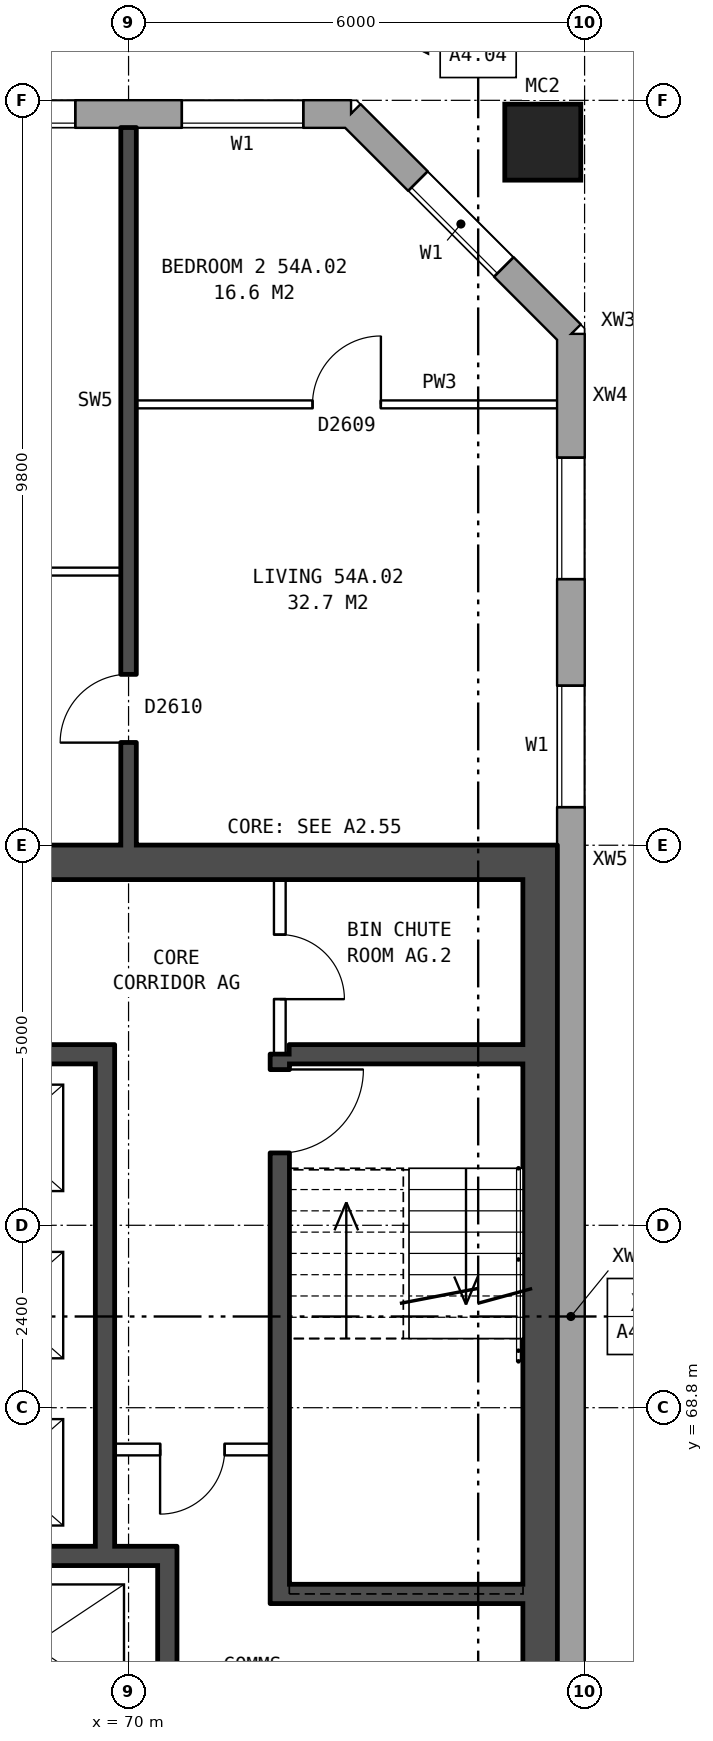
"""IFC4 building model, lengths in metres.
Left out: names, types, materials, properties, quantities, classifications, styles, units other than length and angle.
Written with IfcOpenShell. Run it as: python <this file> out.ifc"""

import sys

from ifc_helpers import new_model, si_unit, direction, frame, frame_2d, origin, origin_2d, place, context, subcontext, project, spatial, rectangle, hollow_rectangle, extrude, element, fill, save


model = new_model("IFC4")
c1 = context("Model", 3, precision=1e-05, world=origin(), true_north=direction((0.0, 1.0)))
c2 = subcontext(c1, "Body", "Model", "MODEL_VIEW")
j1 = project(units=[si_unit("LENGTHUNIT", "METRE"), si_unit("PLANEANGLEUNIT", "RADIAN")], contexts=[c1])
p1 = place(None, origin())
s1 = spatial("IfcSite", under=j1, at=p1, CompositionType="ELEMENT")
p2 = place(p1, origin())
s2 = spatial("IfcBuilding", under=s1, at=p2, CompositionType="ELEMENT")
p3 = place(p2, frame((0.0, 0.0, 191.3)))
s3 = spatial("IfcBuildingStorey", under=s2, at=p3, CompositionType="ELEMENT", Elevation=191.3)
p4 = place(p3, frame((75.45, 85.45, 0.0), z_axis=(0.0, 0.0, 1.0), x_axis=(1.0, 0.0, 0.0)))
e1 = element("IfcColumn", 1, at=p4, inside=s3, PredefinedType="COLUMN", context=c2, shape_type="SweptSolid", body=[
    extrude(hollow_rectangle(XDim=1.0, YDim=1.0, WallThickness=0.055, at=origin_2d()), origin(), (0.0, 0.0, 1.0), 3.1),
])
p5 = place(p3, frame((75.82, 64.403, 0.0), z_axis=(0.0, 0.0, 1.0), x_axis=(0.0, 1.0, 0.0)))
e2 = element("IfcWall", 2, at=p5, inside=s3, PredefinedType="STANDARD", context=c2, shape_type="SweptSolid", body=[
    extrude(rectangle(XDim=11.194, YDim=0.36, at=frame_2d((5.597, 0.0))), origin(), (0.0, 0.0, 1.0), 2.85),
])
p6 = place(p3, frame((75.82, 75.597, 0.0), z_axis=(0.0, 0.0, 1.0), x_axis=(0.0, 1.0, 0.0)))
e3 = element("IfcWall", 3, at=p6, inside=s3, PredefinedType="STANDARD", context=c2, shape_type="SweptSolid", body=[
    extrude(rectangle(XDim=0.806, YDim=0.36, at=frame_2d((0.403, 0.0))), origin(), (0.0, 0.0, 1.0), 1.947),
])
p7 = place(p3, frame((75.82, 76.403, 0.0), z_axis=(0.0, 0.0, 1.0), x_axis=(0.0, 1.0, 0.0)))
e4 = element("IfcWall", 4, at=p7, inside=s3, PredefinedType="STANDARD", context=c2, shape_type="SweptSolid", body=[
    extrude(rectangle(XDim=6.522, YDim=0.36, at=frame_2d((3.261, 0.0))), origin(), (0.0, 0.0, 1.0), 2.85),
])
p8 = place(p7, frame((0.297, 0.0, 0.8)))
e5 = element("IfcOpeningElement", 5, at=p8, cuts=e4, PredefinedType="OPENING", context=c2, shape_type="SweptSolid", body=[
    extrude(rectangle(XDim=1.6, YDim=1.8, at=frame_2d((0.8, 0.9))), frame((0.0, 0.19, 0.0), z_axis=(0.0, -1.0, 0.0), x_axis=(1.0, 0.0, 0.0)), (0.0, 0.0, 1.0), 0.38),
])
p9 = place(p7, frame((3.297, 0.0, 0.8)))
e6 = element("IfcOpeningElement", 6, at=p9, cuts=e4, PredefinedType="OPENING", context=c2, shape_type="SweptSolid", body=[
    extrude(rectangle(XDim=1.6, YDim=1.8, at=frame_2d((0.8, 0.9))), frame((0.0, 0.19, 0.0), z_axis=(0.0, -1.0, 0.0), x_axis=(1.0, 0.0, 0.0)), (0.0, 0.0, 1.0), 0.38),
])
p10 = place(p3, frame((75.82, 82.925, 0.0), z_axis=(0.0, 0.0, 1.0), x_axis=(-0.707106781187, 0.707106781187, 0.0)))
e7 = element("IfcWall", 7, at=p10, inside=s3, PredefinedType="STANDARD", context=c2, shape_type="SweptSolid", body=[
    extrude(rectangle(XDim=4.094, YDim=0.36, at=frame_2d((2.047, 0.0))), origin(), (0.0, 0.0, 1.0), 2.85),
])
p11 = place(p10, frame((1.247, 0.0, 0.8)))
e8 = element("IfcOpeningElement", 8, at=p11, cuts=e7, PredefinedType="OPENING", context=c2, shape_type="SweptSolid", body=[
    extrude(rectangle(XDim=1.6, YDim=1.8, at=frame_2d((0.8, 0.9))), frame((0.0, 0.19, 0.0), z_axis=(0.0, -1.0, 0.0), x_axis=(1.0, 0.0, 0.0)), (0.0, 0.0, 1.0), 0.38),
])
p12 = place(p3, frame((72.925, 85.82, 0.0), z_axis=(0.0, 0.0, 1.0), x_axis=(-1.0, 0.0, 0.0)))
e9 = element("IfcWall", 9, at=p12, inside=s3, PredefinedType="STANDARD", context=c2, shape_type="SweptSolid", body=[
    extrude(rectangle(XDim=39.601, YDim=0.36, at=frame_2d((19.8, 0.0))), origin(), (0.0, 0.0, 1.0), 2.85),
])
p13 = place(p12, frame((0.625, 0.0, 0.8)))
e10 = element("IfcOpeningElement", 10, at=p13, cuts=e9, PredefinedType="OPENING", context=c2, shape_type="SweptSolid", body=[
    extrude(rectangle(XDim=1.6, YDim=1.8, at=frame_2d((0.8, 0.9))), frame((0.0, 0.19, 0.0), z_axis=(0.0, -1.0, 0.0), x_axis=(1.0, 0.0, 0.0)), (0.0, 0.0, 1.0), 0.38),
])
p14 = place(p12, frame((3.625, 0.0, 0.8)))
e11 = element("IfcOpeningElement", 11, at=p14, cuts=e9, PredefinedType="OPENING", context=c2, shape_type="SweptSolid", body=[
    extrude(rectangle(XDim=1.6, YDim=1.8, at=frame_2d((0.8, 0.9))), frame((0.0, 0.19, 0.0), z_axis=(0.0, -1.0, 0.0), x_axis=(1.0, 0.0, 0.0)), (0.0, 0.0, 1.0), 0.38),
])
p15 = place(p12, frame((6.625, 0.0, 0.8)))
e12 = element("IfcOpeningElement", 12, at=p15, cuts=e9, PredefinedType="OPENING", context=c2, shape_type="SweptSolid", body=[
    extrude(rectangle(XDim=1.6, YDim=1.8, at=frame_2d((0.8, 0.9))), frame((0.0, 0.19, 0.0), z_axis=(0.0, -1.0, 0.0), x_axis=(1.0, 0.0, 0.0)), (0.0, 0.0, 1.0), 0.38),
])
p16 = place(p12, frame((9.625, 0.0, 0.8)))
e13 = element("IfcOpeningElement", 13, at=p16, cuts=e9, PredefinedType="OPENING", context=c2, shape_type="SweptSolid", body=[
    extrude(rectangle(XDim=1.6, YDim=1.8, at=frame_2d((0.8, 0.9))), frame((0.0, 0.19, 0.0), z_axis=(0.0, -1.0, 0.0), x_axis=(1.0, 0.0, 0.0)), (0.0, 0.0, 1.0), 0.38),
])
p17 = place(p12, frame((12.625, 0.0, 0.8)))
e14 = element("IfcOpeningElement", 14, at=p17, cuts=e9, PredefinedType="OPENING", context=c2, shape_type="SweptSolid", body=[
    extrude(rectangle(XDim=1.6, YDim=1.8, at=frame_2d((0.8, 0.9))), frame((0.0, 0.19, 0.0), z_axis=(0.0, -1.0, 0.0), x_axis=(1.0, 0.0, 0.0)), (0.0, 0.0, 1.0), 0.38),
])
p18 = place(p12, frame((15.625, 0.0, 0.8)))
e15 = element("IfcOpeningElement", 15, at=p18, cuts=e9, PredefinedType="OPENING", context=c2, shape_type="SweptSolid", body=[
    extrude(rectangle(XDim=1.6, YDim=1.8, at=frame_2d((0.8, 0.9))), frame((0.0, 0.19, 0.0), z_axis=(0.0, -1.0, 0.0), x_axis=(1.0, 0.0, 0.0)), (0.0, 0.0, 1.0), 0.38),
])
p19 = place(p12, frame((18.975, 0.0, 0.15)))
e16 = element("IfcOpeningElement", 16, at=p19, cuts=e9, PredefinedType="OPENING", context=c2, shape_type="SweptSolid", body=[
    extrude(rectangle(XDim=1.6, YDim=1.2, at=frame_2d((0.8, 0.6))), frame((0.0, 0.19, 0.0), z_axis=(0.0, -1.0, 0.0), x_axis=(1.0, 0.0, 0.0)), (0.0, 0.0, 1.0), 0.38),
])
p20 = place(p12, frame((21.375, 0.0, 1.7)))
e17 = element("IfcOpeningElement", 17, at=p20, cuts=e9, PredefinedType="OPENING", context=c2, shape_type="SweptSolid", body=[
    extrude(rectangle(XDim=0.6, YDim=0.9, at=frame_2d((0.3, 0.45))), frame((0.0, 0.19, 0.0), z_axis=(0.0, -1.0, 0.0), x_axis=(1.0, 0.0, 0.0)), (0.0, 0.0, 1.0), 0.38),
])
p21 = place(p12, frame((24.625, 0.0, 0.8)))
e18 = element("IfcOpeningElement", 18, at=p21, cuts=e9, PredefinedType="OPENING", context=c2, shape_type="SweptSolid", body=[
    extrude(rectangle(XDim=1.6, YDim=1.8, at=frame_2d((0.8, 0.9))), frame((0.0, 0.19, 0.0), z_axis=(0.0, -1.0, 0.0), x_axis=(1.0, 0.0, 0.0)), (0.0, 0.0, 1.0), 0.38),
])
p22 = place(p12, frame((27.625, 0.0, 0.8)))
e19 = element("IfcOpeningElement", 19, at=p22, cuts=e9, PredefinedType="OPENING", context=c2, shape_type="SweptSolid", body=[
    extrude(rectangle(XDim=1.6, YDim=1.8, at=frame_2d((0.8, 0.9))), frame((0.0, 0.19, 0.0), z_axis=(0.0, -1.0, 0.0), x_axis=(1.0, 0.0, 0.0)), (0.0, 0.0, 1.0), 0.38),
])
p23 = place(p12, frame((30.625, 0.0, 0.8)))
e20 = element("IfcOpeningElement", 20, at=p23, cuts=e9, PredefinedType="OPENING", context=c2, shape_type="SweptSolid", body=[
    extrude(rectangle(XDim=1.6, YDim=1.8, at=frame_2d((0.8, 0.9))), frame((0.0, 0.19, 0.0), z_axis=(0.0, -1.0, 0.0), x_axis=(1.0, 0.0, 0.0)), (0.0, 0.0, 1.0), 0.38),
])
p24 = place(p12, frame((33.625, 0.0, 0.8)))
e21 = element("IfcOpeningElement", 21, at=p24, cuts=e9, PredefinedType="OPENING", context=c2, shape_type="SweptSolid", body=[
    extrude(rectangle(XDim=1.6, YDim=1.8, at=frame_2d((0.8, 0.9))), frame((0.0, 0.19, 0.0), z_axis=(0.0, -1.0, 0.0), x_axis=(1.0, 0.0, 0.0)), (0.0, 0.0, 1.0), 0.38),
])
p25 = place(p12, frame((36.625, 0.0, 0.8)))
e22 = element("IfcOpeningElement", 22, at=p25, cuts=e9, PredefinedType="OPENING", context=c2, shape_type="SweptSolid", body=[
    extrude(rectangle(XDim=1.6, YDim=1.8, at=frame_2d((0.8, 0.9))), frame((0.0, 0.19, 0.0), z_axis=(0.0, -1.0, 0.0), x_axis=(1.0, 0.0, 0.0)), (0.0, 0.0, 1.0), 0.38),
])
p26 = place(p12, frame((22.275, 0.0, 0.8)))
e23 = element("IfcOpeningElement", 23, at=p26, cuts=e9, PredefinedType="OPENING", context=c2, shape_type="SweptSolid", body=[
    extrude(rectangle(XDim=1.4, YDim=1.8, at=frame_2d((0.7, 0.9))), frame((0.0, 0.19, 0.0), z_axis=(0.0, -1.0, 0.0), x_axis=(1.0, 0.0, 0.0)), (0.0, 0.0, 1.0), 0.38),
])
p27 = place(p3, frame((75.415, 63.8, 0.0), z_axis=(0.0, 0.0, 1.0), x_axis=(0.0, 1.0, 0.0)))
e24 = element("IfcWall", 24, at=p27, inside=s3, PredefinedType="SHEAR", context=c2, shape_type="SweptSolid", body=[
    extrude(rectangle(XDim=12.4, YDim=0.45, at=frame_2d((6.2, 0.0))), origin(), (0.0, 0.0, 1.0), 2.85),
])
p28 = place(p3, frame((67.09, 75.975, 0.0), z_axis=(0.0, 0.0, 1.0), x_axis=(1.0, 0.0, 0.0)))
e25 = element("IfcWall", 25, at=p28, inside=s3, PredefinedType="SHEAR", context=c2, shape_type="SweptSolid", body=[
    extrude(rectangle(XDim=8.1, YDim=0.45, at=frame_2d((4.05, 0.0))), origin(), (0.0, 0.0, 1.0), 2.85),
])
p29 = place(p3, frame((72.115, 66.35, 0.0), z_axis=(0.0, 0.0, 1.0), x_axis=(1.0, 0.0, 0.0)))
e26 = element("IfcWall", 26, at=p29, inside=s3, PredefinedType="SHEAR", context=c2, shape_type="SweptSolid", body=[
    extrude(rectangle(XDim=3.075, YDim=0.25, at=frame_2d((1.538, 0.0))), origin(), (0.0, 0.0, 1.0), 2.85),
])
p30 = place(p3, frame((67.09, 66.85, 0.0), z_axis=(0.0, 0.0, 1.0), x_axis=(1.0, 0.0, 0.0)))
e27 = element("IfcWall", 27, at=p30, inside=s3, PredefinedType="SHEAR", context=c2, shape_type="SweptSolid", body=[
    extrude(rectangle(XDim=3.545, YDim=0.25, at=frame_2d((1.772, 0.0))), origin(), (0.0, 0.0, 1.0), 2.85),
])
p31 = place(p3, frame((69.815, 68.25, 0.0), z_axis=(0.0, 0.0, 1.0), x_axis=(1.0, 0.0, 0.0)))
e28 = element("IfcWall", 28, at=p31, inside=s3, PredefinedType="PARTITIONING", context=c2, shape_type="SweptSolid", body=[
    extrude(rectangle(XDim=2.05, YDim=0.15, at=frame_2d((1.025, 0.0))), origin(), (0.0, 0.0, 1.0), 2.85),
])
p32 = place(p31, frame((0.6, 0.0, 0.0)))
e29 = element("IfcOpeningElement", 29, at=p32, cuts=e28, PredefinedType="OPENING", context=c2, shape_type="SweptSolid", body=[
    extrude(rectangle(XDim=0.85, YDim=2.1, at=frame_2d((0.425, 1.05))), frame((0.0, 0.085, 0.0), z_axis=(0.0, -1.0, 0.0), x_axis=(1.0, 0.0, 0.0)), (0.0, 0.0, 1.0), 0.17),
])
p33 = place(p3, frame((67.09, 73.45, 0.0), z_axis=(0.0, 0.0, 1.0), x_axis=(1.0, 0.0, 0.0)))
e30 = element("IfcWall", 30, at=p33, inside=s3, PredefinedType="SHEAR", context=c2, shape_type="SweptSolid", body=[
    extrude(rectangle(XDim=2.475, YDim=0.25, at=frame_2d((1.237, 0.0))), origin(), (0.0, 0.0, 1.0), 2.85),
])
p34 = place(p3, frame((72.115, 73.45, 0.0), z_axis=(0.0, 0.0, 1.0), x_axis=(1.0, 0.0, 0.0)))
e31 = element("IfcWall", 31, at=p34, inside=s3, PredefinedType="SHEAR", context=c2, shape_type="SweptSolid", body=[
    extrude(rectangle(XDim=3.075, YDim=0.25, at=frame_2d((1.538, 0.0))), origin(), (0.0, 0.0, 1.0), 2.85),
])
p35 = place(p3, frame((69.69, 66.975, 0.0), z_axis=(0.0, 0.0, 1.0), x_axis=(0.0, 1.0, 0.0)))
e32 = element("IfcWall", 32, at=p35, inside=s3, PredefinedType="SHEAR", context=c2, shape_type="SweptSolid", body=[
    extrude(rectangle(XDim=6.6, YDim=0.25, at=frame_2d((3.3, 0.0))), origin(), (0.0, 0.0, 1.0), 2.85),
])
p36 = place(p3, frame((70.51, 64.25, 0.0), z_axis=(0.0, 0.0, 1.0), x_axis=(0.0, 1.0, 0.0)))
e33 = element("IfcWall", 33, at=p36, inside=s3, PredefinedType="SHEAR", context=c2, shape_type="SweptSolid", body=[
    extrude(rectangle(XDim=2.475, YDim=0.25, at=frame_2d((1.238, 0.0))), origin(), (0.0, 0.0, 1.0), 2.85),
])
p37 = place(p3, frame((71.99, 66.225, 0.0), z_axis=(0.0, 0.0, 1.0), x_axis=(0.0, 1.0, 0.0)))
e34 = element("IfcWall", 34, at=p37, inside=s3, PredefinedType="SHEAR", context=c2, shape_type="SweptSolid", body=[
    extrude(rectangle(XDim=7.225, YDim=0.25, at=frame_2d((3.612, 0.0))), origin(), (0.0, 0.0, 1.0), 2.85),
])
p38 = place(p37, frame((5.925, 0.0, 0.0)))
e35 = element("IfcOpeningElement", 35, at=p38, cuts=e34, PredefinedType="OPENING", context=c2, shape_type="SweptSolid", body=[
    extrude(rectangle(XDim=1.1, YDim=2.1, at=frame_2d((0.55, 1.05))), frame((0.0, 0.135, 0.0), z_axis=(0.0, -1.0, 0.0), x_axis=(1.0, 0.0, 0.0)), (0.0, 0.0, 1.0), 0.27),
])
p39 = place(p3, frame((71.99, 73.45, 0.0), z_axis=(0.0, 0.0, 1.0), x_axis=(0.0, 1.0, 0.0)))
e36 = element("IfcWall", 36, at=p39, inside=s3, PredefinedType="PARTITIONING", context=c2, shape_type="SweptSolid", body=[
    extrude(rectangle(XDim=2.3, YDim=0.15, at=frame_2d((1.15, 0.0))), origin(), (0.0, 0.0, 1.0), 2.85),
])
p40 = place(p39, frame((0.725, 0.0, 0.0)))
e37 = element("IfcOpeningElement", 37, at=p40, cuts=e36, PredefinedType="OPENING", context=c2, shape_type="SweptSolid", body=[
    extrude(rectangle(XDim=0.85, YDim=2.1, at=frame_2d((0.425, 1.05))), frame((0.0, 0.085, 0.0), z_axis=(0.0, -1.0, 0.0), x_axis=(1.0, 0.0, 0.0)), (0.0, 0.0, 1.0), 0.17),
])
p41 = place(p3, frame((64.1, 79.8, 0.0), z_axis=(0.0, 0.0, 1.0), x_axis=(1.0, 0.0, 0.0)))
e38 = element("IfcWall", 38, at=p41, inside=s3, PredefinedType="PARTITIONING", context=c2, shape_type="SweptSolid", body=[
    extrude(rectangle(XDim=5.8, YDim=0.1, at=frame_2d((2.9, 0.0))), origin(), (0.0, 0.0, 1.0), 2.85),
])
p42 = place(p41, frame((3.6, 0.0, 0.0)))
e39 = element("IfcOpeningElement", 39, at=p42, cuts=e38, PredefinedType="OPENING", context=c2, shape_type="SweptSolid", body=[
    extrude(rectangle(XDim=0.9, YDim=2.1, at=frame_2d((0.45, 1.05))), frame((0.0, 0.06, 0.0), z_axis=(0.0, -1.0, 0.0), x_axis=(1.0, 0.0, 0.0)), (0.0, 0.0, 1.0), 0.12),
])
p43 = place(p41, frame((0.7, 0.0, 0.0)))
e40 = element("IfcOpeningElement", 40, at=p43, cuts=e38, PredefinedType="OPENING", context=c2, shape_type="SweptSolid", body=[
    extrude(rectangle(XDim=0.9, YDim=2.1, at=frame_2d((0.45, 1.05))), frame((0.0, 0.06, 0.0), z_axis=(0.0, -1.0, 0.0), x_axis=(1.0, 0.0, 0.0)), (0.0, 0.0, 1.0), 0.12),
])
p44 = place(p3, frame((70.1, 82.0, 0.0), z_axis=(0.0, 0.0, 1.0), x_axis=(1.0, 0.0, 0.0)))
e41 = element("IfcWall", 41, at=p44, inside=s3, PredefinedType="PARTITIONING", context=c2, shape_type="SweptSolid", body=[
    extrude(rectangle(XDim=5.54, YDim=0.1, at=frame_2d((2.77, 0.0))), origin(), (0.0, 0.0, 1.0), 2.85),
])
p45 = place(p44, frame((2.32, 0.0, 0.0)))
e42 = element("IfcOpeningElement", 42, at=p45, cuts=e41, PredefinedType="OPENING", context=c2, shape_type="SweptSolid", body=[
    extrude(rectangle(XDim=0.9, YDim=2.1, at=frame_2d((0.45, 1.05))), frame((0.0, 0.06, 0.0), z_axis=(0.0, -1.0, 0.0), x_axis=(1.0, 0.0, 0.0)), (0.0, 0.0, 1.0), 0.12),
])
p46 = place(p3, frame((70.0, 76.2, 0.0), z_axis=(0.0, 0.0, 1.0), x_axis=(0.0, 1.0, 0.0)))
e43 = element("IfcWall", 43, at=p46, inside=s3, PredefinedType="SOLIDWALL", context=c2, shape_type="SweptSolid", body=[
    extrude(rectangle(XDim=9.44, YDim=0.2, at=frame_2d((4.72, 0.0))), origin(), (0.0, 0.0, 1.0), 2.85),
])
p47 = place(p46, frame((1.35, 0.0, 0.0)))
e44 = element("IfcOpeningElement", 44, at=p47, cuts=e43, PredefinedType="OPENING", context=c2, shape_type="SweptSolid", body=[
    extrude(rectangle(XDim=0.9, YDim=2.1, at=frame_2d((0.45, 1.05))), frame((0.0, 0.11, 0.0), z_axis=(0.0, -1.0, 0.0), x_axis=(1.0, 0.0, 0.0)), (0.0, 0.0, 1.0), 0.22),
])
p48 = place(p8, origin())
e45 = element("IfcWindow", 45, at=p48, inside=s3, PartitioningType="SINGLE_PANEL", PredefinedType="WINDOW", context=c2, shape_type="SweptSolid", body=[
    extrude(rectangle(XDim=1.6, YDim=1.8, at=frame_2d((0.8, 0.9))), frame((0.0, 0.15, 0.0), z_axis=(0.0, -1.0, 0.0), x_axis=(1.0, 0.0, 0.0)), (0.0, 0.0, 1.0), 0.06),
])
fill(e5, e45)
p49 = place(p9, origin())
e46 = element("IfcWindow", 46, at=p49, inside=s3, PartitioningType="SINGLE_PANEL", PredefinedType="WINDOW", context=c2, shape_type="SweptSolid", body=[
    extrude(rectangle(XDim=1.6, YDim=1.8, at=frame_2d((0.8, 0.9))), frame((0.0, 0.15, 0.0), z_axis=(0.0, -1.0, 0.0), x_axis=(1.0, 0.0, 0.0)), (0.0, 0.0, 1.0), 0.06),
])
fill(e6, e46)
p50 = place(p11, origin())
e47 = element("IfcWindow", 47, at=p50, inside=s3, PartitioningType="SINGLE_PANEL", PredefinedType="WINDOW", context=c2, shape_type="SweptSolid", body=[
    extrude(rectangle(XDim=1.6, YDim=1.8, at=frame_2d((0.8, 0.9))), frame((0.0, 0.15, 0.0), z_axis=(0.0, -1.0, 0.0), x_axis=(1.0, 0.0, 0.0)), (0.0, 0.0, 1.0), 0.06),
])
fill(e8, e47)
p51 = place(p13, origin())
e48 = element("IfcWindow", 48, at=p51, inside=s3, PartitioningType="SINGLE_PANEL", PredefinedType="WINDOW", context=c2, shape_type="SweptSolid", body=[
    extrude(rectangle(XDim=1.6, YDim=1.8, at=frame_2d((0.8, 0.9))), frame((0.0, 0.15, 0.0), z_axis=(0.0, -1.0, 0.0), x_axis=(1.0, 0.0, 0.0)), (0.0, 0.0, 1.0), 0.06),
])
fill(e10, e48)
p52 = place(p14, origin())
e49 = element("IfcWindow", 49, at=p52, inside=s3, PartitioningType="SINGLE_PANEL", PredefinedType="WINDOW", context=c2, shape_type="SweptSolid", body=[
    extrude(rectangle(XDim=1.6, YDim=1.8, at=frame_2d((0.8, 0.9))), frame((0.0, 0.15, 0.0), z_axis=(0.0, -1.0, 0.0), x_axis=(1.0, 0.0, 0.0)), (0.0, 0.0, 1.0), 0.06),
])
fill(e11, e49)
p53 = place(p38, frame((1.1, 0.0, 0.0), z_axis=(0.0, 0.0, 1.0), x_axis=(-1.0, 0.0, 0.0)))
e50 = element("IfcDoor", 50, at=p53, inside=s3, OperationType="SINGLE_SWING_LEFT", PredefinedType="DOOR", context=c2, shape_type="SweptSolid", body=[
    extrude(rectangle(XDim=1.1, YDim=2.1, at=frame_2d((0.55, 1.05))), frame((0.0, 0.025, 0.0), z_axis=(0.0, -1.0, 0.0), x_axis=(1.0, 0.0, 0.0)), (0.0, 0.0, 1.0), 0.05),
])
fill(e35, e50)
p54 = place(p32, frame((0.85, 0.0, 0.0), z_axis=(0.0, 0.0, 1.0), x_axis=(-1.0, 0.0, 0.0)))
e51 = element("IfcDoor", 51, at=p54, inside=s3, OperationType="SINGLE_SWING_RIGHT", PredefinedType="DOOR", context=c2, shape_type="SweptSolid", body=[
    extrude(rectangle(XDim=0.85, YDim=2.1, at=frame_2d((0.425, 1.05))), frame((0.0, 0.025, 0.0), z_axis=(0.0, -1.0, 0.0), x_axis=(1.0, 0.0, 0.0)), (0.0, 0.0, 1.0), 0.05),
])
fill(e29, e51)
p55 = place(p40, frame((0.85, 0.0, 0.0), z_axis=(0.0, 0.0, 1.0), x_axis=(-1.0, 0.0, 0.0)))
e52 = element("IfcDoor", 52, at=p55, inside=s3, OperationType="SINGLE_SWING_RIGHT", PredefinedType="DOOR", context=c2, shape_type="SweptSolid", body=[
    extrude(rectangle(XDim=0.85, YDim=2.1, at=frame_2d((0.425, 1.05))), frame((0.0, 0.025, 0.0), z_axis=(0.0, -1.0, 0.0), x_axis=(1.0, 0.0, 0.0)), (0.0, 0.0, 1.0), 0.05),
])
fill(e37, e52)
p56 = place(p45, origin())
e53 = element("IfcDoor", 53, at=p56, inside=s3, OperationType="SINGLE_SWING_RIGHT", PredefinedType="DOOR", context=c2, shape_type="SweptSolid", body=[
    extrude(rectangle(XDim=0.9, YDim=2.1, at=frame_2d((0.45, 1.05))), frame((0.0, 0.025, 0.0), z_axis=(0.0, -1.0, 0.0), x_axis=(1.0, 0.0, 0.0)), (0.0, 0.0, 1.0), 0.05),
])
fill(e42, e53)
p57 = place(p47, origin())
e54 = element("IfcDoor", 54, at=p57, inside=s3, OperationType="SINGLE_SWING_LEFT", PredefinedType="DOOR", context=c2, shape_type="SweptSolid", body=[
    extrude(rectangle(XDim=0.9, YDim=2.1, at=frame_2d((0.45, 1.05))), frame((0.0, 0.025, 0.0), z_axis=(0.0, -1.0, 0.0), x_axis=(1.0, 0.0, 0.0)), (0.0, 0.0, 1.0), 0.05),
])
fill(e44, e54)
save(model, sys.argv[1])
